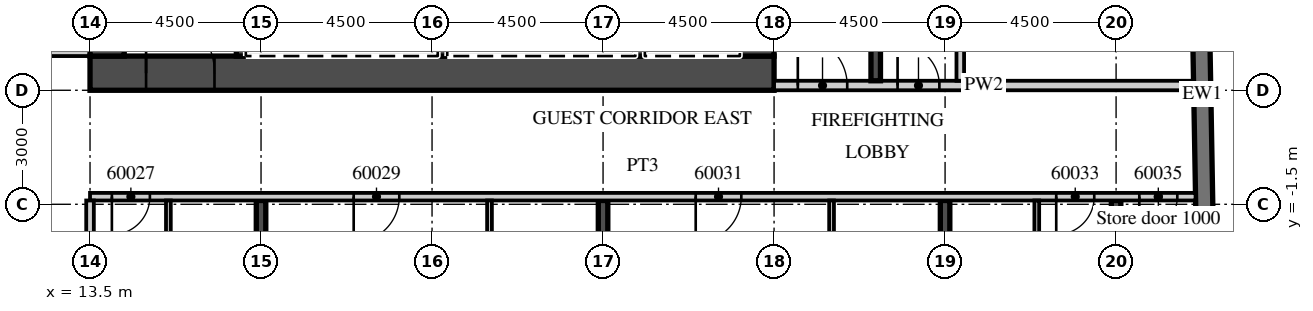
"""IFC4 building model, lengths in metres.
Left out: names, types, materials, properties, quantities, classifications, styles, units other than length and angle.
Written with IfcOpenShell. Run it as: python <this file> out.ifc"""

import sys

from ifc_helpers import new_model, si_unit, direction, frame, frame_2d, origin, place, context, subcontext, project, spatial, rectangle, extrude, element, fill, save


model = new_model("IFC4")
c1 = context("Model", 3, precision=1e-05, world=origin(), true_north=direction((0.0, 1.0)))
c2 = subcontext(c1, "Body", "Model", "MODEL_VIEW")
j1 = project(units=[si_unit("LENGTHUNIT", "METRE"), si_unit("PLANEANGLEUNIT", "RADIAN")], contexts=[c1])
p1 = place(None, origin())
s1 = spatial("IfcSite", under=j1, at=p1, CompositionType="ELEMENT")
p2 = place(p1, origin())
s2 = spatial("IfcBuilding", under=s1, at=p2, CompositionType="ELEMENT")
p3 = place(p2, frame((0.0, 0.0, 244.1)))
s3 = spatial("IfcBuildingStorey", under=s2, at=p3, CompositionType="ELEMENT", Elevation=244.1)
p4 = place(p3, frame((18.0, -19.079, 0.0), z_axis=(0.0, 0.0, 1.0), x_axis=(0.0, 1.0, 0.0)))
e1 = element("IfcWall", 1, at=p4, inside=s3, PredefinedType="SHEAR", context=c2, shape_type="SweptSolid", body=[
    extrude(rectangle(XDim=17.679, YDim=0.25, at=frame_2d((8.84, 0.0))), origin(), (0.0, 0.0, 1.0), 3.3),
])
p5 = place(p3, frame((27.0, -18.922, 0.0), z_axis=(0.0, 0.0, 1.0), x_axis=(0.0, 1.0, 0.0)))
e2 = element("IfcWall", 2, at=p5, inside=s3, PredefinedType="SHEAR", context=c2, shape_type="SweptSolid", body=[
    extrude(rectangle(XDim=17.522, YDim=0.25, at=frame_2d((8.761, 0.0))), origin(), (0.0, 0.0, 1.0), 3.3),
])
p6 = place(p3, frame((36.0, -18.765, 0.0), z_axis=(0.0, 0.0, 1.0), x_axis=(0.0, 1.0, 0.0)))
e3 = element("IfcWall", 3, at=p6, inside=s3, PredefinedType="SHEAR", context=c2, shape_type="SweptSolid", body=[
    extrude(rectangle(XDim=17.365, YDim=0.25, at=frame_2d((8.683, 0.0))), origin(), (0.0, 0.0, 1.0), 3.3),
])
p7 = place(p3, frame((40.5, -18.325, 0.0), z_axis=(0.0, 0.0, 1.0), x_axis=(0.0, 1.0, 0.0)))
e4 = element("IfcWall", 4, at=p7, inside=s3, PredefinedType="SHEAR", context=c2, shape_type="SweptSolid", body=[
    extrude(rectangle(XDim=16.925, YDim=0.25, at=frame_2d((8.463, 0.0))), origin(), (0.0, 0.0, 1.0), 3.3),
])
p8 = place(p3, frame((43.057, -15.103, 0.0), z_axis=(0.0, 0.0, 1.0), x_axis=(-0.017452408953, 0.999847695112, 0.0)))
e5 = element("IfcWall", 5, at=p8, inside=s3, PredefinedType="SOLIDWALL", context=c2, shape_type="SweptSolid", body=[
    extrude(rectangle(XDim=33.0, YDim=0.45, at=frame_2d((16.5, 0.0))), origin(), (0.0, 0.0, 1.0), 3.02),
])
p9 = place(p3, frame((-13.5, 2.5, 0.0), z_axis=(0.0, 0.0, 1.0), x_axis=(1.0, 0.0, 0.0)))
e6 = element("IfcWall", 6, at=p9, inside=s3, PredefinedType="PARTITIONING", context=c2, shape_type="SweptSolid", body=[
    extrude(rectangle(XDim=27.0, YDim=0.2, at=frame_2d((13.5, 0.0))), origin(), (0.0, 0.0, 1.0), 3.02),
])
p10 = place(p9, frame((0.575, 0.0, 0.0)))
e7 = element("IfcOpeningElement", 7, at=p10, cuts=e6, PredefinedType="OPENING", context=c2, shape_type="SweptSolid", body=[
    extrude(rectangle(XDim=1.0, YDim=2.1, at=frame_2d((0.5, 1.05))), frame((0.0, 0.11, 0.0), z_axis=(0.0, -1.0, 0.0), x_axis=(1.0, 0.0, 0.0)), (0.0, 0.0, 1.0), 0.22),
])
p11 = place(p9, frame((6.938, 0.0, 0.0)))
e8 = element("IfcOpeningElement", 8, at=p11, cuts=e6, PredefinedType="OPENING", context=c2, shape_type="SweptSolid", body=[
    extrude(rectangle(XDim=1.2, YDim=2.1, at=frame_2d((0.6, 1.05))), frame((0.0, 0.11, 0.0), z_axis=(0.0, -1.0, 0.0), x_axis=(1.0, 0.0, 0.0)), (0.0, 0.0, 1.0), 0.22),
])
p12 = place(p9, frame((15.938, 0.0, 0.0)))
e9 = element("IfcOpeningElement", 9, at=p12, cuts=e6, PredefinedType="OPENING", context=c2, shape_type="SweptSolid", body=[
    extrude(rectangle(XDim=1.2, YDim=2.1, at=frame_2d((0.6, 1.05))), frame((0.0, 0.11, 0.0), z_axis=(0.0, -1.0, 0.0), x_axis=(1.0, 0.0, 0.0)), (0.0, 0.0, 1.0), 0.22),
])
p13 = place(p9, frame((23.075, 0.0, 0.0)))
e10 = element("IfcOpeningElement", 10, at=p13, cuts=e6, PredefinedType="OPENING", context=c2, shape_type="SweptSolid", body=[
    extrude(rectangle(XDim=1.0, YDim=2.1, at=frame_2d((0.5, 1.05))), frame((0.0, 0.11, 0.0), z_axis=(0.0, -1.0, 0.0), x_axis=(1.0, 0.0, 0.0)), (0.0, 0.0, 1.0), 0.22),
])
p14 = place(p3, frame((13.5, -1.3, 0.0), z_axis=(0.0, 0.0, 1.0), x_axis=(1.0, 0.0, 0.0)))
e11 = element("IfcWall", 11, at=p14, inside=s3, PredefinedType="PARTITIONING", context=c2, shape_type="SweptSolid", body=[
    extrude(rectangle(XDim=29.091, YDim=0.2, at=frame_2d((14.545, 0.0))), origin(), (0.0, 0.0, 1.0), 3.02),
])
p15 = place(p14, frame((0.575, 0.0, 0.0)))
e12 = element("IfcOpeningElement", 12, at=p15, cuts=e11, PredefinedType="OPENING", context=c2, shape_type="SweptSolid", body=[
    extrude(rectangle(XDim=1.0, YDim=2.1, at=frame_2d((0.5, 1.05))), frame((0.0, 0.11, 0.0), z_axis=(0.0, -1.0, 0.0), x_axis=(1.0, 0.0, 0.0)), (0.0, 0.0, 1.0), 0.22),
])
p16 = place(p14, frame((6.938, 0.0, 0.0)))
e13 = element("IfcOpeningElement", 13, at=p16, cuts=e11, PredefinedType="OPENING", context=c2, shape_type="SweptSolid", body=[
    extrude(rectangle(XDim=1.2, YDim=2.1, at=frame_2d((0.6, 1.05))), frame((0.0, 0.11, 0.0), z_axis=(0.0, -1.0, 0.0), x_axis=(1.0, 0.0, 0.0)), (0.0, 0.0, 1.0), 0.22),
])
p17 = place(p14, frame((15.938, 0.0, 0.0)))
e14 = element("IfcOpeningElement", 14, at=p17, cuts=e11, PredefinedType="OPENING", context=c2, shape_type="SweptSolid", body=[
    extrude(rectangle(XDim=1.2, YDim=2.1, at=frame_2d((0.6, 1.05))), frame((0.0, 0.11, 0.0), z_axis=(0.0, -1.0, 0.0), x_axis=(1.0, 0.0, 0.0)), (0.0, 0.0, 1.0), 0.22),
])
p18 = place(p14, frame((25.425, 0.0, 0.0)))
e15 = element("IfcOpeningElement", 15, at=p18, cuts=e11, PredefinedType="OPENING", context=c2, shape_type="SweptSolid", body=[
    extrude(rectangle(XDim=1.0, YDim=2.1, at=frame_2d((0.5, 1.05))), frame((0.0, 0.11, 0.0), z_axis=(0.0, -1.0, 0.0), x_axis=(1.0, 0.0, 0.0)), (0.0, 0.0, 1.0), 0.22),
])
p19 = place(p14, frame((27.611, 0.0, 0.0)))
e16 = element("IfcOpeningElement", 16, at=p19, cuts=e11, PredefinedType="OPENING", context=c2, shape_type="SweptSolid", body=[
    extrude(rectangle(XDim=1.0, YDim=2.4, at=frame_2d((0.5, 1.2))), frame((0.0, 0.11, 0.0), z_axis=(0.0, -1.0, 0.0), x_axis=(1.0, 0.0, 0.0)), (0.0, 0.0, 1.0), 0.22),
])
p20 = place(p3, frame((13.5, -19.17, 0.0), z_axis=(0.0, 0.0, 1.0), x_axis=(0.0, 1.0, 0.0)))
e17 = element("IfcWall", 17, at=p20, inside=s3, PredefinedType="PARTITIONING", context=c2, shape_type="SweptSolid", body=[
    extrude(rectangle(XDim=17.77, YDim=0.2, at=frame_2d((8.885, 0.0))), origin(), (0.0, 0.0, 1.0), 3.02),
])
p21 = place(p3, frame((15.562, -9.125, 0.0), z_axis=(0.0, 0.0, 1.0), x_axis=(0.0, 1.0, 0.0)))
e18 = element("IfcWall", 18, at=p21, inside=s3, PredefinedType="PARTITIONING", context=c2, shape_type="SweptSolid", body=[
    extrude(rectangle(XDim=7.725, YDim=0.125, at=frame_2d((3.863, 0.0))), origin(), (0.0, 0.0, 1.0), 3.02),
])
p22 = place(p21, frame((4.375, 0.0, 0.0)))
e19 = element("IfcOpeningElement", 19, at=p22, cuts=e18, PredefinedType="OPENING", context=c2, shape_type="SweptSolid", body=[
    extrude(rectangle(XDim=0.9, YDim=2.1, at=frame_2d((0.45, 1.05))), frame((0.0, 0.073, 0.0), z_axis=(0.0, -1.0, 0.0), x_axis=(1.0, 0.0, 0.0)), (0.0, 0.0, 1.0), 0.145),
])
p23 = place(p3, frame((24.012, -9.125, 0.0), z_axis=(0.0, 0.0, 1.0), x_axis=(0.0, 1.0, 0.0)))
e20 = element("IfcWall", 20, at=p23, inside=s3, PredefinedType="PARTITIONING", context=c2, shape_type="SweptSolid", body=[
    extrude(rectangle(XDim=7.725, YDim=0.125, at=frame_2d((3.863, 0.0))), origin(), (0.0, 0.0, 1.0), 3.02),
])
p24 = place(p23, frame((4.375, 0.0, 0.0)))
e21 = element("IfcOpeningElement", 21, at=p24, cuts=e20, PredefinedType="OPENING", context=c2, shape_type="SweptSolid", body=[
    extrude(rectangle(XDim=0.9, YDim=2.1, at=frame_2d((0.45, 1.05))), frame((0.0, 0.073, 0.0), z_axis=(0.0, -1.0, 0.0), x_axis=(1.0, 0.0, 0.0)), (0.0, 0.0, 1.0), 0.145),
])
p25 = place(p3, frame((33.013, -9.125, 0.0), z_axis=(0.0, 0.0, 1.0), x_axis=(0.0, 1.0, 0.0)))
e22 = element("IfcWall", 22, at=p25, inside=s3, PredefinedType="PARTITIONING", context=c2, shape_type="SweptSolid", body=[
    extrude(rectangle(XDim=7.725, YDim=0.125, at=frame_2d((3.863, 0.0))), origin(), (0.0, 0.0, 1.0), 3.02),
])
p26 = place(p25, frame((4.375, 0.0, 0.0)))
e23 = element("IfcOpeningElement", 23, at=p26, cuts=e22, PredefinedType="OPENING", context=c2, shape_type="SweptSolid", body=[
    extrude(rectangle(XDim=0.9, YDim=2.1, at=frame_2d((0.45, 1.05))), frame((0.0, 0.073, 0.0), z_axis=(0.0, -1.0, 0.0), x_axis=(1.0, 0.0, 0.0)), (0.0, 0.0, 1.0), 0.145),
])
p27 = place(p3, frame((38.413, -9.125, 0.0), z_axis=(0.0, 0.0, 1.0), x_axis=(0.0, 1.0, 0.0)))
e24 = element("IfcWall", 24, at=p27, inside=s3, PredefinedType="PARTITIONING", context=c2, shape_type="SweptSolid", body=[
    extrude(rectangle(XDim=7.725, YDim=0.125, at=frame_2d((3.863, 0.0))), origin(), (0.0, 0.0, 1.0), 3.02),
])
p28 = place(p27, frame((4.375, 0.0, 0.0)))
e25 = element("IfcOpeningElement", 25, at=p28, cuts=e24, PredefinedType="OPENING", context=c2, shape_type="SweptSolid", body=[
    extrude(rectangle(XDim=0.9, YDim=2.1, at=frame_2d((0.45, 1.05))), frame((0.0, 0.073, 0.0), z_axis=(0.0, -1.0, 0.0), x_axis=(1.0, 0.0, 0.0)), (0.0, 0.0, 1.0), 0.145),
])
p29 = place(p3, frame((13.5, 1.95, 0.0), z_axis=(0.0, 0.0, 1.0), x_axis=(1.0, 0.0, 0.0)))
e26 = element("IfcWall", 26, at=p29, inside=s3, PredefinedType="SHEAR", context=c2, shape_type="SweptSolid", body=[
    extrude(rectangle(XDim=18.0, YDim=0.9, at=frame_2d((9.0, 0.0))), origin(), (0.0, 0.0, 1.0), 3.02),
])
p30 = place(p29, frame((1.475, 0.0, 0.0)))
e27 = element("IfcOpeningElement", 27, at=p30, cuts=e26, PredefinedType="OPENING", context=c2, shape_type="SweptSolid", body=[
    extrude(rectangle(XDim=1.8, YDim=2.1, at=frame_2d((0.9, 1.05))), frame((0.0, 0.46, 0.0), z_axis=(0.0, -1.0, 0.0), x_axis=(1.0, 0.0, 0.0)), (0.0, 0.0, 1.0), 0.92),
])
p31 = place(p3, frame((31.05, 2.4, 0.0), z_axis=(0.0, 0.0, 1.0), x_axis=(0.0, 1.0, 0.0)))
e28 = element("IfcWall", 28, at=p31, inside=s3, PredefinedType="SHEAR", context=c2, shape_type="SweptSolid", body=[
    extrude(rectangle(XDim=12.8, YDim=0.9, at=frame_2d((6.4, 0.0))), origin(), (0.0, 0.0, 1.0), 3.02),
])
p32 = place(p31, frame((0.2, 0.0, 0.0)))
e29 = element("IfcOpeningElement", 29, at=p32, cuts=e28, PredefinedType="OPENING", context=c2, shape_type="SweptSolid", body=[
    extrude(rectangle(XDim=1.1, YDim=2.1, at=frame_2d((0.55, 1.05))), frame((0.0, 0.46, 0.0), z_axis=(0.0, -1.0, 0.0), x_axis=(1.0, 0.0, 0.0)), (0.0, 0.0, 1.0), 0.92),
])
p33 = place(p3, frame((13.95, 2.4, 0.0), z_axis=(0.0, 0.0, 1.0), x_axis=(0.0, 1.0, 0.0)))
e30 = element("IfcWall", 30, at=p33, inside=s3, PredefinedType="SHEAR", context=c2, shape_type="SweptSolid", body=[
    extrude(rectangle(XDim=12.2, YDim=0.9, at=frame_2d((6.1, 0.0))), origin(), (0.0, 0.0, 1.0), 3.02),
])
p34 = place(p3, frame((17.475, 2.4, 0.0), z_axis=(0.0, 0.0, 1.0), x_axis=(0.0, 1.0, 0.0)))
e31 = element("IfcWall", 31, at=p34, inside=s3, PredefinedType="SHEAR", context=c2, shape_type="SweptSolid", body=[
    extrude(rectangle(XDim=3.15, YDim=0.25, at=frame_2d((1.575, 0.0))), origin(), (0.0, 0.0, 1.0), 3.02),
])
for number, where, z_axis, x_axis in (
    (32, (27.975, 2.4, 0.0), (0.0, 0.0, 1.0), (0.0, 1.0, 0.0)),
    (33, (22.775, 2.4, 0.0), (0.0, 0.0, 1.0), (0.0, 1.0, 0.0)),
):
    element("IfcWall", number, at=place(p3, frame(where, z_axis=z_axis, x_axis=x_axis)), inside=s3, PredefinedType="SHEAR", context=c2, shape_type="SweptSolid", body=[
        extrude(rectangle(XDim=2.9, YDim=0.25, at=frame_2d((1.45, 0.0))), origin(), (0.0, 0.0, 1.0), 3.02),
    ])
p35 = place(p3, frame((31.5, 1.625, 0.0), z_axis=(0.0, 0.0, 1.0), x_axis=(1.0, 0.0, 0.0)))
e34 = element("IfcWall", 34, at=p35, inside=s3, PredefinedType="PARTITIONING", context=c2, shape_type="SweptSolid", body=[
    extrude(rectangle(XDim=11.04, YDim=0.25, at=frame_2d((5.52, 0.0))), origin(), (0.0, 0.0, 1.0), 3.02),
])
p36 = place(p35, frame((0.625, 0.0, 0.0)))
e35 = element("IfcOpeningElement", 35, at=p36, cuts=e34, PredefinedType="OPENING", context=c2, shape_type="SweptSolid", body=[
    extrude(rectangle(XDim=1.3, YDim=2.1, at=frame_2d((0.65, 1.05))), frame((0.0, 0.135, 0.0), z_axis=(0.0, -1.0, 0.0), x_axis=(1.0, 0.0, 0.0)), (0.0, 0.0, 1.0), 0.27),
])
p37 = place(p35, frame((3.25, 0.0, 0.0)))
e36 = element("IfcOpeningElement", 36, at=p37, cuts=e34, PredefinedType="OPENING", context=c2, shape_type="SweptSolid", body=[
    extrude(rectangle(XDim=1.1, YDim=2.1, at=frame_2d((0.55, 1.05))), frame((0.0, 0.135, 0.0), z_axis=(0.0, -1.0, 0.0), x_axis=(1.0, 0.0, 0.0)), (0.0, 0.0, 1.0), 0.27),
])
p38 = place(p3, frame((34.175, 1.75, 0.0), z_axis=(0.0, 0.0, 1.0), x_axis=(0.0, 1.0, 0.0)))
e37 = element("IfcWall", 37, at=p38, inside=s3, PredefinedType="SHEAR", context=c2, shape_type="SweptSolid", body=[
    extrude(rectangle(XDim=8.35, YDim=0.25, at=frame_2d((4.175, 0.0))), origin(), (0.0, 0.0, 1.0), 3.02),
])
p39 = place(p3, frame((36.4, 1.75, 0.0), z_axis=(0.0, 0.0, 1.0), x_axis=(0.0, 1.0, 0.0)))
e38 = element("IfcWall", 38, at=p39, inside=s3, PredefinedType="PARTITIONING", context=c2, shape_type="SweptSolid", body=[
    extrude(rectangle(XDim=15.95, YDim=0.2, at=frame_2d((7.975, 0.0))), origin(), (0.0, 0.0, 1.0), 3.02),
])
p40 = place(p39, frame((14.7, 0.0, 0.0)))
e39 = element("IfcOpeningElement", 39, at=p40, cuts=e38, PredefinedType="OPENING", context=c2, shape_type="SweptSolid", body=[
    extrude(rectangle(XDim=0.9, YDim=2.1, at=frame_2d((0.45, 1.05))), frame((0.0, 0.11, 0.0), z_axis=(0.0, -1.0, 0.0), x_axis=(1.0, 0.0, 0.0)), (0.0, 0.0, 1.0), 0.22),
])
p41 = place(p15, origin())
e40 = element("IfcDoor", 40, at=p41, inside=s3, OperationType="SINGLE_SWING_LEFT", PredefinedType="DOOR", context=c2, shape_type="SweptSolid", body=[
    extrude(rectangle(XDim=1.0, YDim=2.1, at=frame_2d((0.5, 1.05))), frame((0.0, 0.025, 0.0), z_axis=(0.0, -1.0, 0.0), x_axis=(1.0, 0.0, 0.0)), (0.0, 0.0, 1.0), 0.05),
])
fill(e12, e40)
p42 = place(p16, origin())
e41 = element("IfcDoor", 41, at=p42, inside=s3, OperationType="SINGLE_SWING_LEFT", PredefinedType="DOOR", context=c2, shape_type="SweptSolid", body=[
    extrude(rectangle(XDim=1.2, YDim=2.1, at=frame_2d((0.6, 1.05))), frame((0.0, 0.025, 0.0), z_axis=(0.0, -1.0, 0.0), x_axis=(1.0, 0.0, 0.0)), (0.0, 0.0, 1.0), 0.05),
])
fill(e13, e41)
p43 = place(p17, origin())
e42 = element("IfcDoor", 42, at=p43, inside=s3, OperationType="SINGLE_SWING_LEFT", PredefinedType="DOOR", context=c2, shape_type="SweptSolid", body=[
    extrude(rectangle(XDim=1.2, YDim=2.1, at=frame_2d((0.6, 1.05))), frame((0.0, 0.025, 0.0), z_axis=(0.0, -1.0, 0.0), x_axis=(1.0, 0.0, 0.0)), (0.0, 0.0, 1.0), 0.05),
])
fill(e14, e42)
p44 = place(p18, origin())
e43 = element("IfcDoor", 43, at=p44, inside=s3, OperationType="SINGLE_SWING_LEFT", PredefinedType="DOOR", context=c2, shape_type="SweptSolid", body=[
    extrude(rectangle(XDim=1.0, YDim=2.1, at=frame_2d((0.5, 1.05))), frame((0.0, 0.025, 0.0), z_axis=(0.0, -1.0, 0.0), x_axis=(1.0, 0.0, 0.0)), (0.0, 0.0, 1.0), 0.05),
])
fill(e15, e43)
p45 = place(p19, origin())
e44 = element("IfcDoor", 44, at=p45, inside=s3, OperationType="SINGLE_SWING_LEFT", PredefinedType="DOOR", context=c2, shape_type="SweptSolid", body=[
    extrude(rectangle(XDim=1.0, YDim=2.4, at=frame_2d((0.5, 1.2))), frame((0.0, 0.025, 0.0), z_axis=(0.0, -1.0, 0.0), x_axis=(1.0, 0.0, 0.0)), (0.0, 0.0, 1.0), 0.05),
])
fill(e16, e44)
p46 = place(p30, origin())
e45 = element("IfcDoor", 45, at=p46, inside=s3, OperationType="DOUBLE_DOOR_DOUBLE_SWING", PredefinedType="DOOR", context=c2, shape_type="SweptSolid", body=[
    extrude(rectangle(XDim=1.8, YDim=2.1, at=frame_2d((0.9, 1.05))), frame((0.0, 0.025, 0.0), z_axis=(0.0, -1.0, 0.0), x_axis=(1.0, 0.0, 0.0)), (0.0, 0.0, 1.0), 0.05),
])
fill(e27, e45)
p47 = place(p36, origin())
e46 = element("IfcDoor", 46, at=p47, inside=s3, OperationType="SINGLE_SWING_LEFT", PredefinedType="DOOR", context=c2, shape_type="SweptSolid", body=[
    extrude(rectangle(XDim=1.3, YDim=2.1, at=frame_2d((0.65, 1.05))), frame((0.0, 0.025, 0.0), z_axis=(0.0, -1.0, 0.0), x_axis=(1.0, 0.0, 0.0)), (0.0, 0.0, 1.0), 0.05),
])
fill(e35, e46)
p48 = place(p37, origin())
e47 = element("IfcDoor", 47, at=p48, inside=s3, OperationType="SINGLE_SWING_LEFT", PredefinedType="DOOR", context=c2, shape_type="SweptSolid", body=[
    extrude(rectangle(XDim=1.1, YDim=2.1, at=frame_2d((0.55, 1.05))), frame((0.0, 0.025, 0.0), z_axis=(0.0, -1.0, 0.0), x_axis=(1.0, 0.0, 0.0)), (0.0, 0.0, 1.0), 0.05),
])
fill(e36, e47)
save(model, sys.argv[1])
